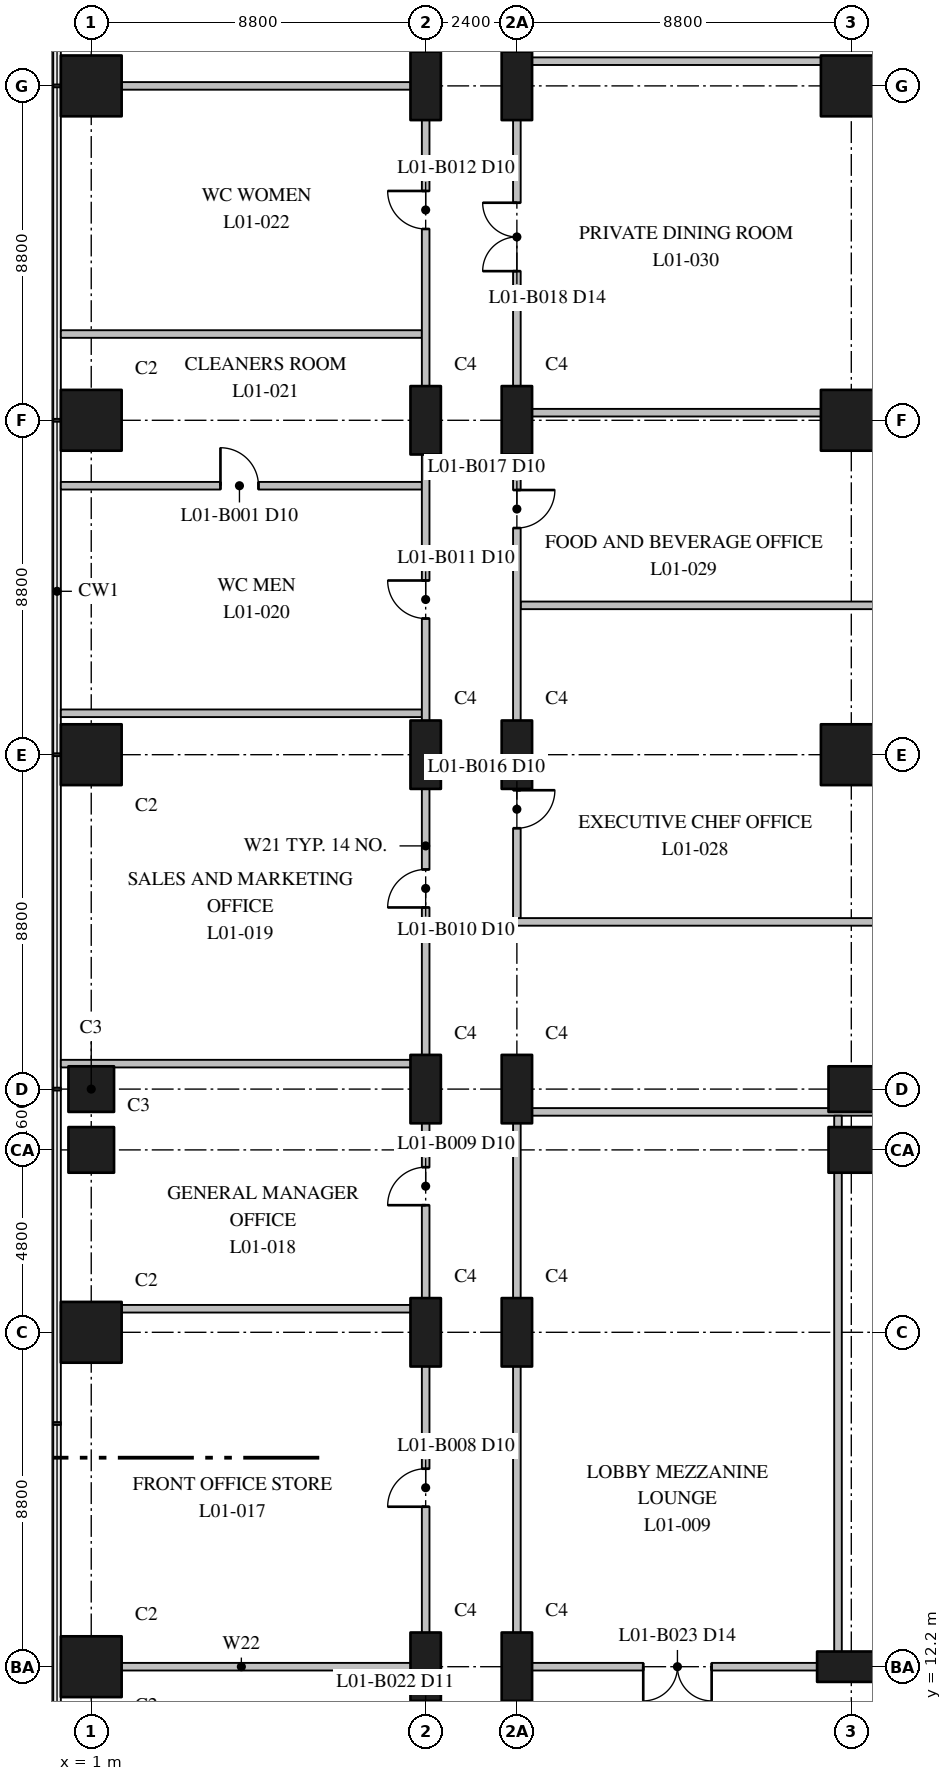
"""IFC4 building model, lengths in metres.
Left out: names, types, materials, properties, quantities, classifications, styles, units other than length and angle.
Written with IfcOpenShell. Run it as: python <this file> out.ifc"""

import sys

from ifc_helpers import new_model, si_unit, direction, frame, frame_2d, origin, origin_2d, place, context, subcontext, project, spatial, rectangle, extrude, element, fill, save


model = new_model("IFC4")
c1 = context("Model", 3, precision=1e-05, world=origin(), true_north=direction((0.0, 1.0)))
c2 = subcontext(c1, "Body", "Model", "MODEL_VIEW")
j1 = project(units=[si_unit("LENGTHUNIT", "METRE"), si_unit("PLANEANGLEUNIT", "RADIAN")], contexts=[c1])
p1 = place(None, origin())
s1 = spatial("IfcSite", under=j1, at=p1, CompositionType="ELEMENT")
p2 = place(p1, origin())
s2 = spatial("IfcBuilding", under=s1, at=p2, CompositionType="ELEMENT")
p3 = place(p2, frame((0.0, 0.0, 7.5)))
s3 = spatial("IfcBuildingStorey", under=s2, at=p3, CompositionType="ELEMENT", Elevation=7.5)
for number, where, z_axis, x_axis in (
    (1, (1.0, 12.2, 0.0), (0.0, 0.0, 1.0), (1.0, 0.0, 0.0)),
    (2, (1.0, 21.0, 0.0), (0.0, 0.0, 1.0), (1.0, 0.0, 0.0)),
):
    element("IfcColumn", number, at=place(p3, frame(where, z_axis=z_axis, x_axis=x_axis)), inside=s3, PredefinedType="COLUMN", context=c2, shape_type="SweptSolid", body=[
        extrude(rectangle(XDim=1.6, YDim=1.6, at=origin_2d()), origin(), (0.0, 0.0, 1.0), 5.5),
    ])
for number, where, z_axis, x_axis in (
    (3, (1.0, 25.8, 0.0), (0.0, 0.0, 1.0), (1.0, 0.0, 0.0)),
    (4, (1.0, 27.4, 0.0), (0.0, 0.0, 1.0), (1.0, 0.0, 0.0)),
):
    element("IfcColumn", number, at=place(p3, frame(where, z_axis=z_axis, x_axis=x_axis)), inside=s3, PredefinedType="COLUMN", context=c2, shape_type="SweptSolid", body=[
        extrude(rectangle(XDim=1.2, YDim=1.2, at=origin_2d()), origin(), (0.0, 0.0, 1.0), 5.5),
    ])
for number, where, z_axis, x_axis in (
    (5, (1.0, 36.2, 0.0), (0.0, 0.0, 1.0), (1.0, 0.0, 0.0)),
    (6, (1.0, 45.0, 0.0), (0.0, 0.0, 1.0), (1.0, 0.0, 0.0)),
    (7, (1.0, 53.8, 0.0), (0.0, 0.0, 1.0), (1.0, 0.0, 0.0)),
):
    element("IfcColumn", number, at=place(p3, frame(where, z_axis=z_axis, x_axis=x_axis)), inside=s3, PredefinedType="COLUMN", context=c2, shape_type="SweptSolid", body=[
        extrude(rectangle(XDim=1.6, YDim=1.6, at=origin_2d()), origin(), (0.0, 0.0, 1.0), 5.5),
    ])
for number, where, z_axis, x_axis in (
    (8, (9.8, 12.2, 0.0), (0.0, 0.0, 1.0), (0.0, 1.0, 0.0)),
    (9, (9.8, 21.0, 0.0), (0.0, 0.0, 1.0), (0.0, 1.0, 0.0)),
    (10, (9.8, 27.4, 0.0), (0.0, 0.0, 1.0), (0.0, 1.0, 0.0)),
    (11, (9.8, 36.2, 0.0), (0.0, 0.0, 1.0), (0.0, 1.0, 0.0)),
    (12, (9.8, 45.0, 0.0), (0.0, 0.0, 1.0), (0.0, 1.0, 0.0)),
    (13, (9.8, 53.8, 0.0), (0.0, 0.0, 1.0), (0.0, 1.0, 0.0)),
    (14, (12.2, 12.2, 0.0), (0.0, 0.0, 1.0), (0.0, 1.0, 0.0)),
    (15, (12.2, 21.0, 0.0), (0.0, 0.0, 1.0), (0.0, 1.0, 0.0)),
    (16, (12.2, 27.4, 0.0), (0.0, 0.0, 1.0), (0.0, 1.0, 0.0)),
    (17, (12.2, 36.2, 0.0), (0.0, 0.0, 1.0), (0.0, 1.0, 0.0)),
    (18, (12.2, 45.0, 0.0), (0.0, 0.0, 1.0), (0.0, 1.0, 0.0)),
    (19, (12.2, 53.8, 0.0), (0.0, 0.0, 1.0), (0.0, 1.0, 0.0)),
    (20, (21.0, 12.2, 0.0), (0.0, 0.0, 1.0), (1.0, 0.0, 0.0)),
):
    element("IfcColumn", number, at=place(p3, frame(where, z_axis=z_axis, x_axis=x_axis)), inside=s3, PredefinedType="COLUMN", context=c2, shape_type="SweptSolid", body=[
        extrude(rectangle(XDim=1.8, YDim=0.8, at=origin_2d()), origin(), (0.0, 0.0, 1.0), 5.5),
    ])
for number, where, z_axis, x_axis in (
    (21, (21.0, 25.8, 0.0), (0.0, 0.0, 1.0), (1.0, 0.0, 0.0)),
    (22, (21.0, 27.4, 0.0), (0.0, 0.0, 1.0), (1.0, 0.0, 0.0)),
):
    element("IfcColumn", number, at=place(p3, frame(where, z_axis=z_axis, x_axis=x_axis)), inside=s3, PredefinedType="COLUMN", context=c2, shape_type="SweptSolid", body=[
        extrude(rectangle(XDim=1.2, YDim=1.2, at=origin_2d()), origin(), (0.0, 0.0, 1.0), 5.5),
    ])
for number, where, z_axis, x_axis in (
    (23, (21.0, 36.2, 0.0), (0.0, 0.0, 1.0), (1.0, 0.0, 0.0)),
    (24, (21.0, 45.0, 0.0), (0.0, 0.0, 1.0), (1.0, 0.0, 0.0)),
    (25, (21.0, 53.8, 0.0), (0.0, 0.0, 1.0), (1.0, 0.0, 0.0)),
):
    element("IfcColumn", number, at=place(p3, frame(where, z_axis=z_axis, x_axis=x_axis)), inside=s3, PredefinedType="COLUMN", context=c2, shape_type="SweptSolid", body=[
        extrude(rectangle(XDim=1.6, YDim=1.6, at=origin_2d()), origin(), (0.0, 0.0, 1.0), 5.5),
    ])
p4 = place(p3, frame((0.2, 12.2, 0.0), z_axis=(0.0, 0.0, 1.0), x_axis=(1.0, 0.0, 0.0)))
e26 = element("IfcWall", 26, at=p4, inside=s3, PredefinedType="PARTITIONING", context=c2, shape_type="SweptSolid", body=[
    extrude(rectangle(XDim=9.5, YDim=0.2, at=frame_2d((4.75, 0.0))), origin(), (0.0, 0.0, 1.0), 5.1),
])
p5 = place(p3, frame((12.1, 12.2, 0.0), z_axis=(0.0, 0.0, 1.0), x_axis=(1.0, 0.0, 0.0)))
e27 = element("IfcWall", 27, at=p5, inside=s3, PredefinedType="PARTITIONING", context=c2, shape_type="SweptSolid", body=[
    extrude(rectangle(XDim=18.9, YDim=0.2, at=frame_2d((9.45, 0.0))), origin(), (0.0, 0.0, 1.0), 5.1),
])
p6 = place(p5, frame((3.425, 0.0, 0.0)))
e28 = element("IfcOpeningElement", 28, at=p6, cuts=e27, PredefinedType="OPENING", context=c2, shape_type="SweptSolid", body=[
    extrude(rectangle(XDim=1.8, YDim=2.4, at=frame_2d((0.9, 1.2))), frame((0.0, 0.11, 0.0), z_axis=(0.0, -1.0, 0.0), x_axis=(1.0, 0.0, 0.0)), (0.0, 0.0, 1.0), 0.22),
])
p7 = place(p5, frame((10.225, 0.0, 0.0)))
e29 = element("IfcOpeningElement", 29, at=p7, cuts=e27, PredefinedType="OPENING", context=c2, shape_type="SweptSolid", body=[
    extrude(rectangle(XDim=1.8, YDim=2.4, at=frame_2d((0.9, 1.2))), frame((0.0, 0.11, 0.0), z_axis=(0.0, -1.0, 0.0), x_axis=(1.0, 0.0, 0.0)), (0.0, 0.0, 1.0), 0.22),
])
p8 = place(p3, frame((12.1, 26.8, 0.0), z_axis=(0.0, 0.0, 1.0), x_axis=(1.0, 0.0, 0.0)))
e30 = element("IfcWall", 30, at=p8, inside=s3, PredefinedType="PARTITIONING", context=c2, shape_type="SweptSolid", body=[
    extrude(rectangle(XDim=51.3, YDim=0.2, at=frame_2d((25.65, 0.0))), origin(), (0.0, 0.0, 1.0), 5.1),
])
p9 = place(p8, frame((18.4, 0.0, 0.0)))
e31 = element("IfcOpeningElement", 31, at=p9, cuts=e30, PredefinedType="OPENING", context=c2, shape_type="SweptSolid", body=[
    extrude(rectangle(XDim=1.0, YDim=2.1, at=frame_2d((0.5, 1.05))), frame((0.0, 0.11, 0.0), z_axis=(0.0, -1.0, 0.0), x_axis=(1.0, 0.0, 0.0)), (0.0, 0.0, 1.0), 0.22),
])
p10 = place(p8, frame((45.2, 0.0, 0.0)))
e32 = element("IfcOpeningElement", 32, at=p10, cuts=e30, PredefinedType="OPENING", context=c2, shape_type="SweptSolid", body=[
    extrude(rectangle(XDim=1.8, YDim=2.4, at=frame_2d((0.9, 1.2))), frame((0.0, 0.11, 0.0), z_axis=(0.0, -1.0, 0.0), x_axis=(1.0, 0.0, 0.0)), (0.0, 0.0, 1.0), 0.22),
])
p11 = place(p3, frame((12.1, 31.8, 0.0), z_axis=(0.0, 0.0, 1.0), x_axis=(1.0, 0.0, 0.0)))
e33 = element("IfcWall", 33, at=p11, inside=s3, PredefinedType="PARTITIONING", context=c2, shape_type="SweptSolid", body=[
    extrude(rectangle(XDim=20.2, YDim=0.2, at=frame_2d((10.1, 0.0))), origin(), (0.0, 0.0, 1.0), 5.1),
])
for number, where, z_axis, x_axis in (
    (34, (0.2, 21.62, 0.0), (0.0, 0.0, 1.0), (1.0, 0.0, 0.0)),
    (35, (0.2, 28.07, 0.0), (0.0, 0.0, 1.0), (1.0, 0.0, 0.0)),
    (36, (0.2, 37.29, 0.0), (0.0, 0.0, 1.0), (1.0, 0.0, 0.0)),
):
    element("IfcWall", number, at=place(p3, frame(where, z_axis=z_axis, x_axis=x_axis)), inside=s3, PredefinedType="PARTITIONING", context=c2, shape_type="SweptSolid", body=[
        extrude(rectangle(XDim=9.5, YDim=0.2, at=frame_2d((4.75, 0.0))), origin(), (0.0, 0.0, 1.0), 5.1),
    ])
p12 = place(p3, frame((0.2, 43.278, 0.0), z_axis=(0.0, 0.0, 1.0), x_axis=(1.0, 0.0, 0.0)))
e37 = element("IfcWall", 37, at=p12, inside=s3, PredefinedType="PARTITIONING", context=c2, shape_type="SweptSolid", body=[
    extrude(rectangle(XDim=9.5, YDim=0.2, at=frame_2d((4.75, 0.0))), origin(), (0.0, 0.0, 1.0), 5.1),
])
p13 = place(p12, frame((4.2, 0.0, 0.0)))
e38 = element("IfcOpeningElement", 38, at=p13, cuts=e37, PredefinedType="OPENING", context=c2, shape_type="SweptSolid", body=[
    extrude(rectangle(XDim=1.0, YDim=2.1, at=frame_2d((0.5, 1.05))), frame((0.0, 0.11, 0.0), z_axis=(0.0, -1.0, 0.0), x_axis=(1.0, 0.0, 0.0)), (0.0, 0.0, 1.0), 0.22),
])
for number, where, z_axis, x_axis in (
    (39, (0.2, 47.27, 0.0), (0.0, 0.0, 1.0), (1.0, 0.0, 0.0)),
    (40, (0.2, 53.8, 0.0), (0.0, 0.0, 1.0), (1.0, 0.0, 0.0)),
):
    element("IfcWall", number, at=place(p3, frame(where, z_axis=z_axis, x_axis=x_axis)), inside=s3, PredefinedType="PARTITIONING", context=c2, shape_type="SweptSolid", body=[
        extrude(rectangle(XDim=9.5, YDim=0.2, at=frame_2d((4.75, 0.0))), origin(), (0.0, 0.0, 1.0), 5.1),
    ])
for number, where, z_axis, x_axis in (
    (41, (12.3, 40.13, 0.0), (0.0, 0.0, 1.0), (1.0, 0.0, 0.0)),
    (42, (12.3, 45.2, 0.0), (0.0, 0.0, 1.0), (1.0, 0.0, 0.0)),
    (43, (12.3, 54.45, 0.0), (0.0, 0.0, 1.0), (1.0, 0.0, 0.0)),
):
    element("IfcWall", number, at=place(p3, frame(where, z_axis=z_axis, x_axis=x_axis)), inside=s3, PredefinedType="PARTITIONING", context=c2, shape_type="SweptSolid", body=[
        extrude(rectangle(XDim=14.4, YDim=0.2, at=frame_2d((7.2, 0.0))), origin(), (0.0, 0.0, 1.0), 5.1),
    ])
p14 = place(p3, frame((9.8, 9.8, 0.0), z_axis=(0.0, 0.0, 1.0), x_axis=(0.0, 1.0, 0.0)))
e44 = element("IfcWall", 44, at=p14, inside=s3, PredefinedType="PARTITIONING", context=c2, shape_type="SweptSolid", body=[
    extrude(rectangle(XDim=48.0, YDim=0.2, at=frame_2d((24.0, 0.0))), origin(), (0.0, 0.0, 1.0), 5.1),
])
p15 = place(p14, frame((6.61, 0.0, 0.0)))
e45 = element("IfcOpeningElement", 45, at=p15, cuts=e44, PredefinedType="OPENING", context=c2, shape_type="SweptSolid", body=[
    extrude(rectangle(XDim=1.0, YDim=2.1, at=frame_2d((0.5, 1.05))), frame((0.0, 0.11, 0.0), z_axis=(0.0, -1.0, 0.0), x_axis=(1.0, 0.0, 0.0)), (0.0, 0.0, 1.0), 0.22),
])
p16 = place(p14, frame((14.545, 0.0, 0.0)))
e46 = element("IfcOpeningElement", 46, at=p16, cuts=e44, PredefinedType="OPENING", context=c2, shape_type="SweptSolid", body=[
    extrude(rectangle(XDim=1.0, YDim=2.1, at=frame_2d((0.5, 1.05))), frame((0.0, 0.11, 0.0), z_axis=(0.0, -1.0, 0.0), x_axis=(1.0, 0.0, 0.0)), (0.0, 0.0, 1.0), 0.22),
])
p17 = place(p14, frame((22.38, 0.0, 0.0)))
e47 = element("IfcOpeningElement", 47, at=p17, cuts=e44, PredefinedType="OPENING", context=c2, shape_type="SweptSolid", body=[
    extrude(rectangle(XDim=1.0, YDim=2.1, at=frame_2d((0.5, 1.05))), frame((0.0, 0.11, 0.0), z_axis=(0.0, -1.0, 0.0), x_axis=(1.0, 0.0, 0.0)), (0.0, 0.0, 1.0), 0.22),
])
p18 = place(p14, frame((29.984, 0.0, 0.0)))
e48 = element("IfcOpeningElement", 48, at=p18, cuts=e44, PredefinedType="OPENING", context=c2, shape_type="SweptSolid", body=[
    extrude(rectangle(XDim=1.0, YDim=2.1, at=frame_2d((0.5, 1.05))), frame((0.0, 0.11, 0.0), z_axis=(0.0, -1.0, 0.0), x_axis=(1.0, 0.0, 0.0)), (0.0, 0.0, 1.0), 0.22),
])
p19 = place(p14, frame((40.235, 0.0, 0.0)))
e49 = element("IfcOpeningElement", 49, at=p19, cuts=e44, PredefinedType="OPENING", context=c2, shape_type="SweptSolid", body=[
    extrude(rectangle(XDim=1.0, YDim=2.1, at=frame_2d((0.5, 1.05))), frame((0.0, 0.11, 0.0), z_axis=(0.0, -1.0, 0.0), x_axis=(1.0, 0.0, 0.0)), (0.0, 0.0, 1.0), 0.22),
])
p20 = place(p14, frame((44.967, 0.0, 0.0)))
e50 = element("IfcOpeningElement", 50, at=p20, cuts=e44, PredefinedType="OPENING", context=c2, shape_type="SweptSolid", body=[
    extrude(rectangle(XDim=1.0, YDim=2.1, at=frame_2d((0.5, 1.05))), frame((0.0, 0.11, 0.0), z_axis=(0.0, -1.0, 0.0), x_axis=(1.0, 0.0, 0.0)), (0.0, 0.0, 1.0), 0.22),
])
p21 = place(p14, frame((0.4, 0.0, 0.0)))
e51 = element("IfcOpeningElement", 51, at=p21, cuts=e44, PredefinedType="OPENING", context=c2, shape_type="SweptSolid", body=[
    extrude(rectangle(XDim=1.0, YDim=2.1, at=frame_2d((0.5, 1.05))), frame((0.0, 0.11, 0.0), z_axis=(0.0, -1.0, 0.0), x_axis=(1.0, 0.0, 0.0)), (0.0, 0.0, 1.0), 0.22),
])
p22 = place(p3, frame((12.2, 12.3, 0.0), z_axis=(0.0, 0.0, 1.0), x_axis=(0.0, 1.0, 0.0)))
e52 = element("IfcWall", 52, at=p22, inside=s3, PredefinedType="PARTITIONING", context=c2, shape_type="SweptSolid", body=[
    extrude(rectangle(XDim=14.4, YDim=0.2, at=frame_2d((7.2, 0.0))), origin(), (0.0, 0.0, 1.0), 5.1),
])
p23 = place(p3, frame((12.2, 31.9, 0.0), z_axis=(0.0, 0.0, 1.0), x_axis=(0.0, 1.0, 0.0)))
e53 = element("IfcWall", 53, at=p23, inside=s3, PredefinedType="PARTITIONING", context=c2, shape_type="SweptSolid", body=[
    extrude(rectangle(XDim=46.3, YDim=0.2, at=frame_2d((23.15, 0.0))), origin(), (0.0, 0.0, 1.0), 5.1),
])
p24 = place(p23, frame((2.365, 0.0, 0.0)))
e54 = element("IfcOpeningElement", 54, at=p24, cuts=e53, PredefinedType="OPENING", context=c2, shape_type="SweptSolid", body=[
    extrude(rectangle(XDim=1.0, YDim=2.1, at=frame_2d((0.5, 1.05))), frame((0.0, 0.11, 0.0), z_axis=(0.0, -1.0, 0.0), x_axis=(1.0, 0.0, 0.0)), (0.0, 0.0, 1.0), 0.22),
])
p25 = place(p23, frame((10.265, 0.0, 0.0)))
e55 = element("IfcOpeningElement", 55, at=p25, cuts=e53, PredefinedType="OPENING", context=c2, shape_type="SweptSolid", body=[
    extrude(rectangle(XDim=1.0, YDim=2.1, at=frame_2d((0.5, 1.05))), frame((0.0, 0.11, 0.0), z_axis=(0.0, -1.0, 0.0), x_axis=(1.0, 0.0, 0.0)), (0.0, 0.0, 1.0), 0.22),
])
p26 = place(p23, frame((17.025, 0.0, 0.0)))
e56 = element("IfcOpeningElement", 56, at=p26, cuts=e53, PredefinedType="OPENING", context=c2, shape_type="SweptSolid", body=[
    extrude(rectangle(XDim=1.8, YDim=2.4, at=frame_2d((0.9, 1.2))), frame((0.0, 0.11, 0.0), z_axis=(0.0, -1.0, 0.0), x_axis=(1.0, 0.0, 0.0)), (0.0, 0.0, 1.0), 0.22),
])
p27 = place(p23, frame((27.665, 0.0, 0.0)))
e57 = element("IfcOpeningElement", 57, at=p27, cuts=e53, PredefinedType="OPENING", context=c2, shape_type="SweptSolid", body=[
    extrude(rectangle(XDim=1.8, YDim=2.4, at=frame_2d((0.9, 1.2))), frame((0.0, 0.11, 0.0), z_axis=(0.0, -1.0, 0.0), x_axis=(1.0, 0.0, 0.0)), (0.0, 0.0, 1.0), 0.22),
])
p28 = place(p23, frame((36.815, 0.0, 0.0)))
e58 = element("IfcOpeningElement", 58, at=p28, cuts=e53, PredefinedType="OPENING", context=c2, shape_type="SweptSolid", body=[
    extrude(rectangle(XDim=1.0, YDim=2.1, at=frame_2d((0.5, 1.05))), frame((0.0, 0.11, 0.0), z_axis=(0.0, -1.0, 0.0), x_axis=(1.0, 0.0, 0.0)), (0.0, 0.0, 1.0), 0.22),
])
p29 = place(p23, frame((42.275, 0.0, 0.0)))
e59 = element("IfcOpeningElement", 59, at=p29, cuts=e53, PredefinedType="OPENING", context=c2, shape_type="SweptSolid", body=[
    extrude(rectangle(XDim=1.8, YDim=2.1, at=frame_2d((0.9, 1.05))), frame((0.0, 0.11, 0.0), z_axis=(0.0, -1.0, 0.0), x_axis=(1.0, 0.0, 0.0)), (0.0, 0.0, 1.0), 0.22),
])
p30 = place(p3, frame((20.65, 12.3, 0.0), z_axis=(0.0, 0.0, 1.0), x_axis=(0.0, 1.0, 0.0)))
e60 = element("IfcWall", 60, at=p30, inside=s3, PredefinedType="PARTITIONING", context=c2, shape_type="SweptSolid", body=[
    extrude(rectangle(XDim=14.4, YDim=0.2, at=frame_2d((7.2, 0.0))), origin(), (0.0, 0.0, 1.0), 5.1),
])
p31 = place(p13, origin())
e61 = element("IfcDoor", 61, at=p31, inside=s3, OperationType="SINGLE_SWING_LEFT", PredefinedType="DOOR", context=c2, shape_type="SweptSolid", body=[
    extrude(rectangle(XDim=1.0, YDim=2.1, at=frame_2d((0.5, 1.05))), frame((0.0, 0.025, 0.0), z_axis=(0.0, -1.0, 0.0), x_axis=(1.0, 0.0, 0.0)), (0.0, 0.0, 1.0), 0.05),
])
fill(e38, e61)
p32 = place(p15, origin())
e62 = element("IfcDoor", 62, at=p32, inside=s3, OperationType="SINGLE_SWING_LEFT", PredefinedType="DOOR", context=c2, shape_type="SweptSolid", body=[
    extrude(rectangle(XDim=1.0, YDim=2.1, at=frame_2d((0.5, 1.05))), frame((0.0, 0.025, 0.0), z_axis=(0.0, -1.0, 0.0), x_axis=(1.0, 0.0, 0.0)), (0.0, 0.0, 1.0), 0.05),
])
fill(e45, e62)
p33 = place(p16, origin())
e63 = element("IfcDoor", 63, at=p33, inside=s3, OperationType="SINGLE_SWING_LEFT", PredefinedType="DOOR", context=c2, shape_type="SweptSolid", body=[
    extrude(rectangle(XDim=1.0, YDim=2.1, at=frame_2d((0.5, 1.05))), frame((0.0, 0.025, 0.0), z_axis=(0.0, -1.0, 0.0), x_axis=(1.0, 0.0, 0.0)), (0.0, 0.0, 1.0), 0.05),
])
fill(e46, e63)
p34 = place(p17, origin())
e64 = element("IfcDoor", 64, at=p34, inside=s3, OperationType="SINGLE_SWING_LEFT", PredefinedType="DOOR", context=c2, shape_type="SweptSolid", body=[
    extrude(rectangle(XDim=1.0, YDim=2.1, at=frame_2d((0.5, 1.05))), frame((0.0, 0.025, 0.0), z_axis=(0.0, -1.0, 0.0), x_axis=(1.0, 0.0, 0.0)), (0.0, 0.0, 1.0), 0.05),
])
fill(e47, e64)
p35 = place(p18, origin())
e65 = element("IfcDoor", 65, at=p35, inside=s3, OperationType="SINGLE_SWING_RIGHT", PredefinedType="DOOR", context=c2, shape_type="SweptSolid", body=[
    extrude(rectangle(XDim=1.0, YDim=2.1, at=frame_2d((0.5, 1.05))), frame((0.0, 0.025, 0.0), z_axis=(0.0, -1.0, 0.0), x_axis=(1.0, 0.0, 0.0)), (0.0, 0.0, 1.0), 0.05),
])
fill(e48, e65)
p36 = place(p19, origin())
e66 = element("IfcDoor", 66, at=p36, inside=s3, OperationType="SINGLE_SWING_RIGHT", PredefinedType="DOOR", context=c2, shape_type="SweptSolid", body=[
    extrude(rectangle(XDim=1.0, YDim=2.1, at=frame_2d((0.5, 1.05))), frame((0.0, 0.025, 0.0), z_axis=(0.0, -1.0, 0.0), x_axis=(1.0, 0.0, 0.0)), (0.0, 0.0, 1.0), 0.05),
])
fill(e49, e66)
p37 = place(p24, frame((1.0, 0.0, 0.0), z_axis=(0.0, 0.0, 1.0), x_axis=(-1.0, 0.0, 0.0)))
e67 = element("IfcDoor", 67, at=p37, inside=s3, OperationType="SINGLE_SWING_RIGHT", PredefinedType="DOOR", context=c2, shape_type="SweptSolid", body=[
    extrude(rectangle(XDim=1.0, YDim=2.1, at=frame_2d((0.5, 1.05))), frame((0.0, 0.025, 0.0), z_axis=(0.0, -1.0, 0.0), x_axis=(1.0, 0.0, 0.0)), (0.0, 0.0, 1.0), 0.05),
])
fill(e54, e67)
p38 = place(p25, frame((1.0, 0.0, 0.0), z_axis=(0.0, 0.0, 1.0), x_axis=(-1.0, 0.0, 0.0)))
e68 = element("IfcDoor", 68, at=p38, inside=s3, OperationType="SINGLE_SWING_RIGHT", PredefinedType="DOOR", context=c2, shape_type="SweptSolid", body=[
    extrude(rectangle(XDim=1.0, YDim=2.1, at=frame_2d((0.5, 1.05))), frame((0.0, 0.025, 0.0), z_axis=(0.0, -1.0, 0.0), x_axis=(1.0, 0.0, 0.0)), (0.0, 0.0, 1.0), 0.05),
])
fill(e55, e68)
p39 = place(p26, origin())
e69 = element("IfcDoor", 69, at=p39, inside=s3, OperationType="DOUBLE_DOOR_SINGLE_SWING", PredefinedType="DOOR", context=c2, shape_type="SweptSolid", body=[
    extrude(rectangle(XDim=1.8, YDim=2.4, at=frame_2d((0.9, 1.2))), frame((0.0, 0.025, 0.0), z_axis=(0.0, -1.0, 0.0), x_axis=(1.0, 0.0, 0.0)), (0.0, 0.0, 1.0), 0.05),
])
fill(e56, e69)
p40 = place(p6, frame((1.8, 0.0, 0.0), z_axis=(0.0, 0.0, 1.0), x_axis=(-1.0, 0.0, 0.0)))
e70 = element("IfcDoor", 70, at=p40, inside=s3, OperationType="DOUBLE_DOOR_SINGLE_SWING", PredefinedType="DOOR", context=c2, shape_type="SweptSolid", body=[
    extrude(rectangle(XDim=1.8, YDim=2.4, at=frame_2d((0.9, 1.2))), frame((0.0, 0.025, 0.0), z_axis=(0.0, -1.0, 0.0), x_axis=(1.0, 0.0, 0.0)), (0.0, 0.0, 1.0), 0.05),
])
fill(e28, e70)
save(model, sys.argv[1])
